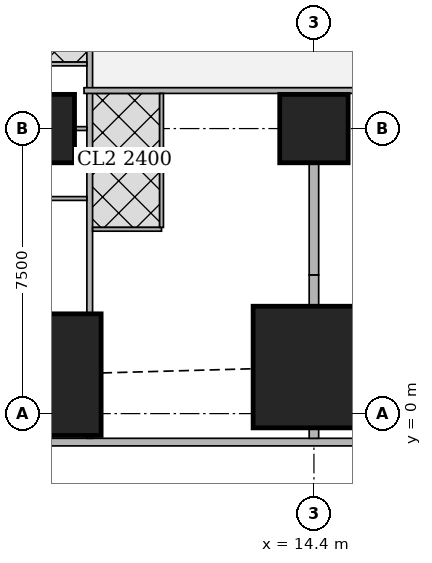
"""IFC4 building model, lengths in metres.
Left out: names, types, materials, properties, quantities, classifications, styles, units other than length and angle.
Written with IfcOpenShell. Run it as: python <this file> out.ifc"""

import sys

from ifc_helpers import new_model, si_unit, direction, frame, frame_2d, origin, origin_2d, place, context, subcontext, project, spatial, rectangle, extrude, element, fill, save


model = new_model("IFC4")
c1 = context("Model", 3, precision=1e-05, world=origin(), true_north=direction((0.0, 1.0)))
c2 = subcontext(c1, "Body", "Model", "MODEL_VIEW")
j1 = project(units=[si_unit("LENGTHUNIT", "METRE"), si_unit("PLANEANGLEUNIT", "RADIAN")], contexts=[c1])
p1 = place(None, origin())
s1 = spatial("IfcSite", under=j1, at=p1, CompositionType="ELEMENT")
p2 = place(p1, origin())
s2 = spatial("IfcBuilding", under=s1, at=p2, CompositionType="ELEMENT")
p3 = place(p2, frame((0.0, 0.0, 20.0)))
s3 = spatial("IfcBuildingStorey", under=s2, at=p3, CompositionType="ELEMENT", Elevation=20.0)
p4 = place(p3, frame((7.2, 1.025, -0.3), z_axis=(0.0, 0.0, 1.0), x_axis=(1.0, 0.0, 0.0)))
e1 = element("IfcColumn", 1, at=p4, inside=s3, PredefinedType="COLUMN", context=c2, shape_type="SweptSolid", body=[
    extrude(rectangle(XDim=3.2, YDim=3.2, at=origin_2d()), origin(), (0.0, 0.0, 1.0), 4.05),
])
p5 = place(p3, frame((14.4, 1.225, 0.0), z_axis=(0.0, 0.0, 1.0), x_axis=(1.0, 0.0, 0.0)))
e2 = element("IfcColumn", 2, at=p5, inside=s3, PredefinedType="COLUMN", context=c2, shape_type="SweptSolid", body=[
    extrude(rectangle(XDim=3.2, YDim=3.2, at=origin_2d()), origin(), (0.0, 0.0, 1.0), 3.75),
])
for number, where, z_axis, x_axis in (
    (3, (7.2, 7.5, 0.0), (0.0, 0.0, 1.0), (1.0, 0.0, 0.0)),
    (4, (14.4, 7.5, 0.0), (0.0, 0.0, 1.0), (1.0, 0.0, 0.0)),
):
    element("IfcColumn", number, at=place(p3, frame(where, z_axis=z_axis, x_axis=x_axis)), inside=s3, PredefinedType="COLUMN", context=c2, shape_type="SweptSolid", body=[
        extrude(rectangle(XDim=1.8, YDim=1.8, at=origin_2d()), origin(), (0.0, 0.0, 1.0), 3.75),
    ])
p6 = place(p3, frame((2.163, -0.75, 0.0), z_axis=(0.0, 0.0, 1.0), x_axis=(1.0, 0.0, 0.0)))
e5 = element("IfcWall", 5, at=p6, inside=s3, PredefinedType="SOLIDWALL", context=c2, shape_type="SweptSolid", body=[
    extrude(rectangle(XDim=45.628, YDim=0.2, at=frame_2d((22.814, 0.0))), origin(), (0.0, 0.0, 1.0), 3.5),
])
p7 = place(p6, frame((9.537, 0.0, 0.9)))
e6 = element("IfcOpeningElement", 6, at=p7, cuts=e5, PredefinedType="OPENING", context=c2, shape_type="SweptSolid", body=[
    extrude(rectangle(XDim=1.8, YDim=1.5, at=frame_2d((0.9, 0.75))), frame((0.0, 0.11, 0.0), z_axis=(0.0, -1.0, 0.0), x_axis=(1.0, 0.0, 0.0)), (0.0, 0.0, 1.0), 0.22),
])
p8 = place(p6, frame((13.137, 0.0, 0.9)))
e7 = element("IfcOpeningElement", 7, at=p8, cuts=e5, PredefinedType="OPENING", context=c2, shape_type="SweptSolid", body=[
    extrude(rectangle(XDim=1.8, YDim=1.5, at=frame_2d((0.9, 0.75))), frame((0.0, 0.11, 0.0), z_axis=(0.0, -1.0, 0.0), x_axis=(1.0, 0.0, 0.0)), (0.0, 0.0, 1.0), 0.22),
])
p9 = place(p6, frame((16.737, 0.0, 0.9)))
e8 = element("IfcOpeningElement", 8, at=p9, cuts=e5, PredefinedType="OPENING", context=c2, shape_type="SweptSolid", body=[
    extrude(rectangle(XDim=1.8, YDim=1.5, at=frame_2d((0.9, 0.75))), frame((0.0, 0.11, 0.0), z_axis=(0.0, -1.0, 0.0), x_axis=(1.0, 0.0, 0.0)), (0.0, 0.0, 1.0), 0.22),
])
p10 = place(p6, frame((20.337, 0.0, 0.9)))
e9 = element("IfcOpeningElement", 9, at=p10, cuts=e5, PredefinedType="OPENING", context=c2, shape_type="SweptSolid", body=[
    extrude(rectangle(XDim=1.8, YDim=1.5, at=frame_2d((0.9, 0.75))), frame((0.0, 0.11, 0.0), z_axis=(0.0, -1.0, 0.0), x_axis=(1.0, 0.0, 0.0)), (0.0, 0.0, 1.0), 0.22),
])
p11 = place(p6, frame((23.937, 0.0, 0.9)))
e10 = element("IfcOpeningElement", 10, at=p11, cuts=e5, PredefinedType="OPENING", context=c2, shape_type="SweptSolid", body=[
    extrude(rectangle(XDim=1.8, YDim=1.5, at=frame_2d((0.9, 0.75))), frame((0.0, 0.11, 0.0), z_axis=(0.0, -1.0, 0.0), x_axis=(1.0, 0.0, 0.0)), (0.0, 0.0, 1.0), 0.22),
])
p12 = place(p6, frame((27.537, 0.0, 0.9)))
e11 = element("IfcOpeningElement", 11, at=p12, cuts=e5, PredefinedType="OPENING", context=c2, shape_type="SweptSolid", body=[
    extrude(rectangle(XDim=1.8, YDim=1.5, at=frame_2d((0.9, 0.75))), frame((0.0, 0.11, 0.0), z_axis=(0.0, -1.0, 0.0), x_axis=(1.0, 0.0, 0.0)), (0.0, 0.0, 1.0), 0.22),
])
p13 = place(p6, frame((31.137, 0.0, 0.9)))
e12 = element("IfcOpeningElement", 12, at=p13, cuts=e5, PredefinedType="OPENING", context=c2, shape_type="SweptSolid", body=[
    extrude(rectangle(XDim=1.8, YDim=1.5, at=frame_2d((0.9, 0.75))), frame((0.0, 0.11, 0.0), z_axis=(0.0, -1.0, 0.0), x_axis=(1.0, 0.0, 0.0)), (0.0, 0.0, 1.0), 0.22),
])
p14 = place(p6, frame((34.737, 0.0, 0.9)))
e13 = element("IfcOpeningElement", 13, at=p14, cuts=e5, PredefinedType="OPENING", context=c2, shape_type="SweptSolid", body=[
    extrude(rectangle(XDim=1.8, YDim=1.5, at=frame_2d((0.9, 0.75))), frame((0.0, 0.11, 0.0), z_axis=(0.0, -1.0, 0.0), x_axis=(1.0, 0.0, 0.0)), (0.0, 0.0, 1.0), 0.22),
])
p15 = place(p3, frame((8.5, -0.65, 0.0), z_axis=(0.0, 0.0, 1.0), x_axis=(0.0, 1.0, 0.0)))
e14 = element("IfcWall", 14, at=p15, inside=s3, PredefinedType="SOLIDWALL", context=c2, shape_type="SweptSolid", body=[
    extrude(rectangle(XDim=0.074, YDim=0.15, at=frame_2d((0.037, 0.0))), origin(), (0.0, 0.0, 1.0), 3.5),
])
p16 = place(p3, frame((8.5, 2.626, 0.0), z_axis=(0.0, 0.0, 1.0), x_axis=(0.0, 1.0, 0.0)))
e15 = element("IfcWall", 15, at=p16, inside=s3, PredefinedType="SOLIDWALL", context=c2, shape_type="SweptSolid", body=[
    extrude(rectangle(XDim=39.773, YDim=0.15, at=frame_2d((19.886, 0.0))), origin(), (0.0, 0.0, 1.0), 2.05),
])
p17 = place(p16, frame((9.786, 0.0, 0.0)))
e16 = element("IfcOpeningElement", 16, at=p17, cuts=e15, PredefinedType="OPENING", context=c2, shape_type="SweptSolid", body=[
    extrude(rectangle(XDim=1.0, YDim=2.0, at=frame_2d((0.5, 1.0))), frame((0.0, 0.085, 0.0), z_axis=(0.0, -1.0, 0.0), x_axis=(1.0, 0.0, 0.0)), (0.0, 0.0, 1.0), 0.17),
])
p18 = place(p16, frame((13.961, 0.0, 0.0)))
e17 = element("IfcOpeningElement", 17, at=p18, cuts=e15, PredefinedType="OPENING", context=c2, shape_type="SweptSolid", body=[
    extrude(rectangle(XDim=1.0, YDim=2.0, at=frame_2d((0.5, 1.0))), frame((0.0, 0.085, 0.0), z_axis=(0.0, -1.0, 0.0), x_axis=(1.0, 0.0, 0.0)), (0.0, 0.0, 1.0), 0.17),
])
p19 = place(p16, frame((24.787, 0.0, 0.0)))
e18 = element("IfcOpeningElement", 18, at=p19, cuts=e15, PredefinedType="OPENING", context=c2, shape_type="SweptSolid", body=[
    extrude(rectangle(XDim=1.0, YDim=2.0, at=frame_2d((0.5, 1.0))), frame((0.0, 0.085, 0.0), z_axis=(0.0, -1.0, 0.0), x_axis=(1.0, 0.0, 0.0)), (0.0, 0.0, 1.0), 0.17),
])
p20 = place(p16, frame((32.287, 0.0, 0.0)))
e19 = element("IfcOpeningElement", 19, at=p20, cuts=e15, PredefinedType="OPENING", context=c2, shape_type="SweptSolid", body=[
    extrude(rectangle(XDim=1.0, YDim=2.0, at=frame_2d((0.5, 1.0))), frame((0.0, 0.085, 0.0), z_axis=(0.0, -1.0, 0.0), x_axis=(1.0, 0.0, 0.0)), (0.0, 0.0, 1.0), 0.17),
])
p21 = place(p3, frame((40.054, 8.5, 0.0), z_axis=(0.0, 0.0, 1.0), x_axis=(-1.0, 0.0, 0.0)))
e20 = element("IfcWall", 20, at=p21, inside=s3, PredefinedType="SOLIDWALL", context=c2, shape_type="SweptSolid", body=[
    extrude(rectangle(XDim=31.704, YDim=0.15, at=frame_2d((15.852, 0.0))), origin(), (0.0, 0.0, 1.0), 3.5),
])
p22 = place(p21, frame((27.321, 0.0, 0.0)))
e21 = element("IfcOpeningElement", 21, at=p22, cuts=e20, PredefinedType="OPENING", context=c2, shape_type="SweptSolid", body=[
    extrude(rectangle(XDim=1.0, YDim=2.1, at=frame_2d((0.5, 1.05))), frame((0.0, 0.085, 0.0), z_axis=(0.0, -1.0, 0.0), x_axis=(1.0, 0.0, 0.0)), (0.0, 0.0, 1.0), 0.17),
])
p23 = place(p21, frame((23.054, 0.0, 0.0)))
e22 = element("IfcOpeningElement", 22, at=p23, cuts=e20, PredefinedType="OPENING", context=c2, shape_type="SweptSolid", body=[
    extrude(rectangle(XDim=1.0, YDim=2.1, at=frame_2d((0.5, 1.05))), frame((0.0, 0.085, 0.0), z_axis=(0.0, -1.0, 0.0), x_axis=(1.0, 0.0, 0.0)), (0.0, 0.0, 1.0), 0.17),
])
p24 = place(p21, frame((15.754, 0.0, 0.0)))
e23 = element("IfcOpeningElement", 23, at=p24, cuts=e20, PredefinedType="OPENING", context=c2, shape_type="SweptSolid", body=[
    extrude(rectangle(XDim=1.0, YDim=2.1, at=frame_2d((0.5, 1.05))), frame((0.0, 0.085, 0.0), z_axis=(0.0, -1.0, 0.0), x_axis=(1.0, 0.0, 0.0)), (0.0, 0.0, 1.0), 0.17),
])
p25 = place(p21, frame((5.754, 0.0, 0.0)))
e24 = element("IfcOpeningElement", 24, at=p25, cuts=e20, PredefinedType="OPENING", context=c2, shape_type="SweptSolid", body=[
    extrude(rectangle(XDim=1.0, YDim=2.1, at=frame_2d((0.5, 1.05))), frame((0.0, 0.085, 0.0), z_axis=(0.0, -1.0, 0.0), x_axis=(1.0, 0.0, 0.0)), (0.0, 0.0, 1.0), 0.17),
])
p26 = place(p3, frame((8.101, 7.5, 0.0), z_axis=(0.0, 0.0, 1.0), x_axis=(1.0, 0.0, 0.0)))
e25 = element("IfcWall", 25, at=p26, inside=s3, PredefinedType="PARTITIONING", context=c2, shape_type="SweptSolid", body=[
    extrude(rectangle(XDim=0.324, YDim=0.1, at=frame_2d((0.162, 0.0))), origin(), (0.0, 0.0, 1.0), 3.5),
])
for number, where, z_axis, x_axis in (
    (26, (4.9, 9.2, 0.0), (0.0, 0.0, 1.0), (1.0, 0.0, 0.0)),
    (27, (4.9, 5.66, 0.0), (0.0, 0.0, 1.0), (1.0, 0.0, 0.0)),
):
    element("IfcWall", number, at=place(p3, frame(where, z_axis=z_axis, x_axis=x_axis)), inside=s3, PredefinedType="PARTITIONING", context=c2, shape_type="SweptSolid", body=[
        extrude(rectangle(XDim=3.525, YDim=0.1, at=frame_2d((1.763, 0.0))), origin(), (0.0, 0.0, 1.0), 3.5),
    ])
p27 = place(p3, frame((10.39, 4.85, 0.0), z_axis=(0.0, 0.0, 1.0), x_axis=(-1.0, 0.0, 0.0)))
e28 = element("IfcWall", 28, at=p27, inside=s3, PredefinedType="PARTITIONING", context=c2, shape_type="SweptSolid", body=[
    extrude(rectangle(XDim=1.815, YDim=0.1, at=frame_2d((0.907, 0.0))), origin(), (0.0, 0.0, 1.0), 3.5),
])
p28 = place(p27, frame((0.49, 0.0, 0.0)))
e29 = element("IfcOpeningElement", 29, at=p28, cuts=e28, PredefinedType="OPENING", context=c2, shape_type="SweptSolid", body=[
    extrude(rectangle(XDim=0.9, YDim=2.1, at=frame_2d((0.45, 1.05))), frame((0.0, 0.06, 0.0), z_axis=(0.0, -1.0, 0.0), x_axis=(1.0, 0.0, 0.0)), (0.0, 0.0, 1.0), 0.12),
])
p29 = place(p3, frame((10.39, 4.9, 0.0), z_axis=(0.0, 0.0, 1.0), x_axis=(0.0, 1.0, 0.0)))
e30 = element("IfcWall", 30, at=p29, inside=s3, PredefinedType="PARTITIONING", context=c2, shape_type="SweptSolid", body=[
    extrude(rectangle(XDim=3.525, YDim=0.1, at=frame_2d((1.763, 0.0))), origin(), (0.0, 0.0, 1.0), 3.5),
])
p30 = place(p3, frame((14.4, -0.65, 0.0), z_axis=(0.0, 0.0, 1.0), x_axis=(0.0, 1.0, 0.0)))
e31 = element("IfcWall", 31, at=p30, inside=s3, PredefinedType="SOLIDWALL", context=c2, shape_type="SweptSolid", body=[
    extrude(rectangle(XDim=0.274, YDim=0.25, at=frame_2d((0.137, 0.0))), origin(), (0.0, 0.0, 1.0), 2.05),
])
p31 = place(p3, frame((14.4, 2.826, 0.0), z_axis=(0.0, 0.0, 1.0), x_axis=(0.0, 1.0, 0.0)))
e32 = element("IfcWall", 32, at=p31, inside=s3, PredefinedType="SOLIDWALL", context=c2, shape_type="SweptSolid", body=[
    extrude(rectangle(XDim=0.824, YDim=0.25, at=frame_2d((0.412, 0.0))), origin(), (0.0, 0.0, 1.0), 2.05),
])
p32 = place(p3, frame((14.4, 3.65, 0.0), z_axis=(0.0, 0.0, 1.0), x_axis=(0.0, 1.0, 0.0)))
e33 = element("IfcWall", 33, at=p32, inside=s3, PredefinedType="SOLIDWALL", context=c2, shape_type="SweptSolid", body=[
    extrude(rectangle(XDim=2.949, YDim=0.25, at=frame_2d((1.475, 0.0))), origin(), (0.0, 0.0, 1.0), 3.5),
])
p33 = place(p7, origin())
e34 = element("IfcWindow", 34, at=p33, inside=s3, PartitioningType="SINGLE_PANEL", PredefinedType="WINDOW", context=c2, shape_type="SweptSolid", body=[
    extrude(rectangle(XDim=1.8, YDim=1.5, at=frame_2d((0.9, 0.75))), frame((0.0, 0.03, 0.0), z_axis=(0.0, -1.0, 0.0), x_axis=(1.0, 0.0, 0.0)), (0.0, 0.0, 1.0), 0.06),
])
fill(e6, e34)
p34 = place(p8, origin())
e35 = element("IfcWindow", 35, at=p34, inside=s3, PartitioningType="SINGLE_PANEL", PredefinedType="WINDOW", context=c2, shape_type="SweptSolid", body=[
    extrude(rectangle(XDim=1.8, YDim=1.5, at=frame_2d((0.9, 0.75))), frame((0.0, 0.03, 0.0), z_axis=(0.0, -1.0, 0.0), x_axis=(1.0, 0.0, 0.0)), (0.0, 0.0, 1.0), 0.06),
])
fill(e7, e35)
p35 = place(p28, origin())
e36 = element("IfcDoor", 36, at=p35, inside=s3, OperationType="SINGLE_SWING_LEFT", PredefinedType="DOOR", context=c2, shape_type="SweptSolid", body=[
    extrude(rectangle(XDim=0.9, YDim=2.1, at=frame_2d((0.45, 1.05))), frame((0.0, 0.025, 0.0), z_axis=(0.0, -1.0, 0.0), x_axis=(1.0, 0.0, 0.0)), (0.0, 0.0, 1.0), 0.05),
])
fill(e29, e36)
p36 = place(p22, origin())
e37 = element("IfcDoor", 37, at=p36, inside=s3, OperationType="SINGLE_SWING_LEFT", PredefinedType="DOOR", context=c2, shape_type="SweptSolid", body=[
    extrude(rectangle(XDim=1.0, YDim=2.1, at=frame_2d((0.5, 1.05))), frame((0.0, 0.025, 0.0), z_axis=(0.0, -1.0, 0.0), x_axis=(1.0, 0.0, 0.0)), (0.0, 0.0, 1.0), 0.05),
])
fill(e21, e37)
save(model, sys.argv[1])
